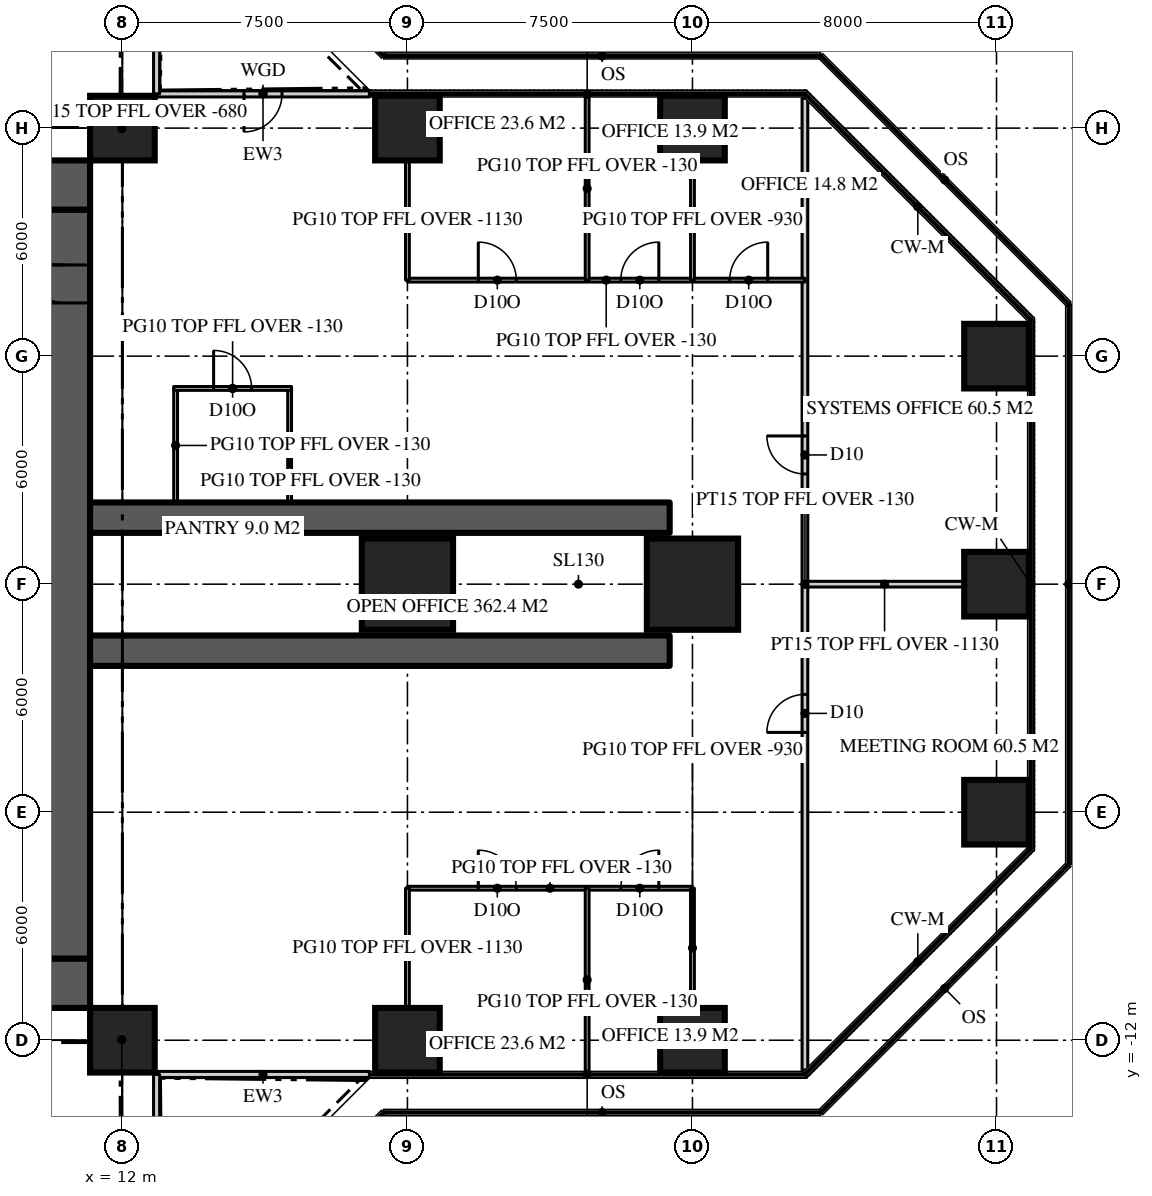
"""IFC4 building model, lengths in metres.
Left out: names, types, materials, properties, quantities, classifications, styles, units other than length and angle.
Written with IfcOpenShell. Run it as: python <this file> out.ifc"""

import sys

from ifc_helpers import new_model, si_unit, direction, frame, frame_2d, origin, origin_2d, place, context, subcontext, project, spatial, rectangle, extrude, element, fill, save


model = new_model("IFC4")
c1 = context("Model", 3, precision=1e-05, world=origin(), true_north=direction((0.0, 1.0)))
c2 = subcontext(c1, "Body", "Model", "MODEL_VIEW")
j1 = project(units=[si_unit("LENGTHUNIT", "METRE"), si_unit("PLANEANGLEUNIT", "RADIAN")], contexts=[c1])
p1 = place(None, origin())
s1 = spatial("IfcSite", under=j1, at=p1, CompositionType="ELEMENT")
p2 = place(p1, origin())
s2 = spatial("IfcBuilding", under=s1, at=p2, CompositionType="ELEMENT")
p3 = place(p2, frame((0.0, 0.0, 147.6)))
s3 = spatial("IfcBuildingStorey", under=s2, at=p3, CompositionType="ELEMENT", Elevation=147.6)
p4 = place(p3, frame((-11.15, 10.5, 0.0), z_axis=(0.0, 0.0, 1.0), x_axis=(1.0, 0.0, 0.0)))
e1 = element("IfcWall", 1, at=p4, inside=s3, PredefinedType="SHEAR", context=c2, shape_type="SweptSolid", body=[
    extrude(rectangle(XDim=22.3, YDim=1.3, at=frame_2d((11.15, 0.0))), origin(), (0.0, 0.0, 1.0), 3.9),
])
p5 = place(p4, frame((4.25, 0.0, 0.0)))
e2 = element("IfcOpeningElement", 2, at=p5, cuts=e1, PredefinedType="OPENING", context=c2, shape_type="SweptSolid", body=[
    extrude(rectangle(XDim=1.8, YDim=2.2, at=frame_2d((0.9, 1.1))), frame((0.0, 0.66, 0.0), z_axis=(0.0, -1.0, 0.0), x_axis=(1.0, 0.0, 0.0)), (0.0, 0.0, 1.0), 1.32),
])
p6 = place(p4, frame((16.25, 0.0, 0.0)))
e3 = element("IfcOpeningElement", 3, at=p6, cuts=e1, PredefinedType="OPENING", context=c2, shape_type="SweptSolid", body=[
    extrude(rectangle(XDim=1.8, YDim=2.2, at=frame_2d((0.9, 1.1))), frame((0.0, 0.66, 0.0), z_axis=(0.0, -1.0, 0.0), x_axis=(1.0, 0.0, 0.0)), (0.0, 0.0, 1.0), 1.32),
])
p7 = place(p3, frame((11.15, -10.5, 0.0), z_axis=(0.0, 0.0, 1.0), x_axis=(-1.0, 0.0, 0.0)))
e4 = element("IfcWall", 4, at=p7, inside=s3, PredefinedType="SHEAR", context=c2, shape_type="SweptSolid", body=[
    extrude(rectangle(XDim=22.3, YDim=1.3, at=frame_2d((11.15, 0.0))), origin(), (0.0, 0.0, 1.0), 3.9),
])
p8 = place(p7, frame((16.25, 0.0, 0.0)))
e5 = element("IfcOpeningElement", 5, at=p8, cuts=e4, PredefinedType="OPENING", context=c2, shape_type="SweptSolid", body=[
    extrude(rectangle(XDim=1.8, YDim=2.2, at=frame_2d((0.9, 1.1))), frame((0.0, 0.66, 0.0), z_axis=(0.0, -1.0, 0.0), x_axis=(1.0, 0.0, 0.0)), (0.0, 0.0, 1.0), 1.32),
])
p9 = place(p7, frame((4.25, 0.0, 0.0)))
e6 = element("IfcOpeningElement", 6, at=p9, cuts=e4, PredefinedType="OPENING", context=c2, shape_type="SweptSolid", body=[
    extrude(rectangle(XDim=1.8, YDim=2.2, at=frame_2d((0.9, 1.1))), frame((0.0, 0.66, 0.0), z_axis=(0.0, -1.0, 0.0), x_axis=(1.0, 0.0, 0.0)), (0.0, 0.0, 1.0), 1.32),
])
p10 = place(p3, frame((10.5, -9.85, 0.0), z_axis=(0.0, 0.0, 1.0), x_axis=(0.0, 1.0, 0.0)))
e7 = element("IfcWall", 7, at=p10, inside=s3, PredefinedType="SHEAR", context=c2, shape_type="SweptSolid", body=[
    extrude(rectangle(XDim=19.7, YDim=1.3, at=frame_2d((9.85, 0.0))), origin(), (0.0, 0.0, 1.0), 3.9),
])
p11 = place(p10, frame((17.25, 0.0, 0.0)))
e8 = element("IfcOpeningElement", 8, at=p11, cuts=e7, PredefinedType="OPENING", context=c2, shape_type="SweptSolid", body=[
    extrude(rectangle(XDim=1.0, YDim=2.2, at=frame_2d((0.5, 1.1))), frame((0.0, 0.66, 0.0), z_axis=(0.0, -1.0, 0.0), x_axis=(1.0, 0.0, 0.0)), (0.0, 0.0, 1.0), 1.32),
])
for number, where, z_axis, x_axis in (
    (9, (11.15, -1.75, 0.0), (0.0, 0.0, 1.0), (1.0, 0.0, 0.0)),
    (10, (11.15, 1.75, 0.0), (0.0, 0.0, 1.0), (1.0, 0.0, 0.0)),
):
    element("IfcWall", number, at=place(p3, frame(where, z_axis=z_axis, x_axis=x_axis)), inside=s3, PredefinedType="SHEAR", context=c2, shape_type="SweptSolid", body=[
        extrude(rectangle(XDim=15.25, YDim=0.8, at=frame_2d((7.625, 0.0))), origin(), (0.0, 0.0, 1.0), 3.9),
    ])
for number, where, z_axis, x_axis in (
    (11, (12.0, -12.0, 0.0), (0.0, 0.0, 1.0), (1.0, 0.0, 0.0)),
    (12, (19.5, -12.0, 0.0), (0.0, 0.0, 1.0), (1.0, 0.0, 0.0)),
    (13, (27.0, -12.0, 0.0), (0.0, 0.0, 1.0), (1.0, 0.0, 0.0)),
    (14, (35.0, -6.0, 0.0), (0.0, 0.0, 1.0), (1.0, 0.0, 0.0)),
):
    element("IfcColumn", number, at=place(p3, frame(where, z_axis=z_axis, x_axis=x_axis)), inside=s3, PredefinedType="COLUMN", context=c2, shape_type="SweptSolid", body=[
        extrude(rectangle(XDim=1.7, YDim=1.7, at=origin_2d()), origin(), (0.0, 0.0, 1.0), 3.9),
    ])
for number, where, z_axis, x_axis in (
    (15, (19.5, 0.0, 0.0), (0.0, 0.0, 1.0), (1.0, 0.0, 0.0)),
    (16, (27.0, 0.0, 0.0), (0.0, 0.0, 1.0), (1.0, 0.0, 0.0)),
):
    element("IfcColumn", number, at=place(p3, frame(where, z_axis=z_axis, x_axis=x_axis)), inside=s3, PredefinedType="COLUMN", context=c2, shape_type="SweptSolid", body=[
        extrude(rectangle(XDim=2.4, YDim=2.4, at=origin_2d()), origin(), (0.0, 0.0, 1.0), 3.9),
    ])
for number, where, z_axis, x_axis in (
    (17, (35.0, 0.0, 0.0), (0.0, 0.0, 1.0), (1.0, 0.0, 0.0)),
    (18, (35.0, 6.0, 0.0), (0.0, 0.0, 1.0), (1.0, 0.0, 0.0)),
    (19, (12.0, 12.0, 0.0), (0.0, 0.0, 1.0), (1.0, 0.0, 0.0)),
    (20, (19.5, 12.0, 0.0), (0.0, 0.0, 1.0), (1.0, 0.0, 0.0)),
    (21, (27.0, 12.0, 0.0), (0.0, 0.0, 1.0), (1.0, 0.0, 0.0)),
):
    element("IfcColumn", number, at=place(p3, frame(where, z_axis=z_axis, x_axis=x_axis)), inside=s3, PredefinedType="COLUMN", context=c2, shape_type="SweptSolid", body=[
        extrude(rectangle(XDim=1.7, YDim=1.7, at=origin_2d()), origin(), (0.0, 0.0, 1.0), 3.9),
    ])
p12 = place(p3, frame((12.9, -12.9, 0.0), z_axis=(0.0, 0.0, 1.0), x_axis=(1.0, 0.0, 0.0)))
e22 = element("IfcWall", 22, at=p12, inside=s3, PredefinedType="SOLIDWALL", context=c2, shape_type="SweptSolid", body=[
    extrude(rectangle(XDim=5.6, YDim=0.16, at=frame_2d((2.8, 0.0))), origin(), (0.0, 0.0, 1.0), 3.77),
])
p13 = place(p3, frame((18.5, 12.9, 0.0), z_axis=(0.0, 0.0, 1.0), x_axis=(-1.0, 0.0, 0.0)))
e23 = element("IfcWall", 23, at=p13, inside=s3, PredefinedType="SOLIDWALL", context=c2, shape_type="SweptSolid", body=[
    extrude(rectangle(XDim=5.6, YDim=0.16, at=frame_2d((2.8, 0.0))), origin(), (0.0, 0.0, 1.0), 3.77),
])
p14 = place(p13, frame((2.3, 0.0, 0.0)))
e24 = element("IfcOpeningElement", 24, at=p14, cuts=e23, PredefinedType="OPENING", context=c2, shape_type="SweptSolid", body=[
    extrude(rectangle(XDim=1.0, YDim=2.2, at=frame_2d((0.5, 1.1))), frame((0.0, 0.09, 0.0), z_axis=(0.0, -1.0, 0.0), x_axis=(1.0, 0.0, 0.0)), (0.0, 0.0, 1.0), 0.18),
])
p15 = place(p3, frame((12.9, 12.9, 0.0), z_axis=(0.0, 0.0, 1.0), x_axis=(0.0, 1.0, 0.0)))
e25 = element("IfcWall", 25, at=p15, inside=s3, PredefinedType="SOLIDWALL", context=c2, shape_type="SweptSolid", body=[
    extrude(rectangle(XDim=5.6, YDim=0.16, at=frame_2d((2.8, 0.0))), origin(), (0.0, 0.0, 1.0), 3.77),
])
p16 = place(p3, frame((12.9, -18.5, 0.0), z_axis=(0.0, 0.0, 1.0), x_axis=(0.0, 1.0, 0.0)))
e26 = element("IfcWall", 26, at=p16, inside=s3, PredefinedType="SOLIDWALL", context=c2, shape_type="SweptSolid", body=[
    extrude(rectangle(XDim=5.6, YDim=0.16, at=frame_2d((2.8, 0.0))), origin(), (0.0, 0.0, 1.0), 3.77),
])
p17 = place(p16, frame((2.3, 0.0, 0.0)))
e27 = element("IfcOpeningElement", 27, at=p17, cuts=e26, PredefinedType="OPENING", context=c2, shape_type="SweptSolid", body=[
    extrude(rectangle(XDim=1.0, YDim=2.2, at=frame_2d((0.5, 1.1))), frame((0.0, 0.09, 0.0), z_axis=(0.0, -1.0, 0.0), x_axis=(1.0, 0.0, 0.0)), (0.0, 0.0, 1.0), 0.18),
])
p18 = place(p3, frame((29.959, -12.786, 0.0), z_axis=(0.0, 0.0, 1.0), x_axis=(0.0, 1.0, 0.0)))
e28 = element("IfcWall", 28, at=p18, inside=s3, PredefinedType="PARTITIONING", context=c2, shape_type="SweptSolid", body=[
    extrude(rectangle(XDim=25.573, YDim=0.15, at=frame_2d((12.786, 0.0))), origin(), (0.0, 0.0, 1.0), 3.77),
])
p19 = place(p18, frame((15.687, 0.0, 0.0)))
e29 = element("IfcOpeningElement", 29, at=p19, cuts=e28, PredefinedType="OPENING", context=c2, shape_type="SweptSolid", body=[
    extrude(rectangle(XDim=1.0, YDim=2.2, at=frame_2d((0.5, 1.1))), frame((0.0, 0.085, 0.0), z_axis=(0.0, -1.0, 0.0), x_axis=(1.0, 0.0, 0.0)), (0.0, 0.0, 1.0), 0.17),
])
p20 = place(p18, frame((8.886, 0.0, 0.0)))
e30 = element("IfcOpeningElement", 30, at=p20, cuts=e28, PredefinedType="OPENING", context=c2, shape_type="SweptSolid", body=[
    extrude(rectangle(XDim=1.0, YDim=2.2, at=frame_2d((0.5, 1.1))), frame((0.0, 0.085, 0.0), z_axis=(0.0, -1.0, 0.0), x_axis=(1.0, 0.0, 0.0)), (0.0, 0.0, 1.0), 0.17),
])
p21 = place(p3, frame((29.959, 0.0, 0.0), z_axis=(0.0, 0.0, 1.0), x_axis=(1.0, 0.0, 0.0)))
e31 = element("IfcWall", 31, at=p21, inside=s3, PredefinedType="PARTITIONING", context=c2, shape_type="SweptSolid", body=[
    extrude(rectangle(XDim=4.191, YDim=0.15, at=frame_2d((2.095, 0.0))), origin(), (0.0, 0.0, 1.0), 2.77),
])
p22 = place(p3, frame((19.5, 8.0, 0.0), z_axis=(0.0, 0.0, 1.0), x_axis=(1.0, 0.0, 0.0)))
e32 = element("IfcWall", 32, at=p22, inside=s3, PredefinedType="PARTITIONING", context=c2, shape_type="SweptSolid", body=[
    extrude(rectangle(XDim=10.459, YDim=0.1, at=frame_2d((5.229, 0.0))), origin(), (0.0, 0.0, 1.0), 3.77),
])
p23 = place(p22, frame((1.865, 0.0, 0.0)))
e33 = element("IfcOpeningElement", 33, at=p23, cuts=e32, PredefinedType="OPENING", context=c2, shape_type="SweptSolid", body=[
    extrude(rectangle(XDim=1.0, YDim=2.2, at=frame_2d((0.5, 1.1))), frame((0.0, 0.06, 0.0), z_axis=(0.0, -1.0, 0.0), x_axis=(1.0, 0.0, 0.0)), (0.0, 0.0, 1.0), 0.12),
])
p24 = place(p22, frame((5.615, 0.0, 0.0)))
e34 = element("IfcOpeningElement", 34, at=p24, cuts=e32, PredefinedType="OPENING", context=c2, shape_type="SweptSolid", body=[
    extrude(rectangle(XDim=1.0, YDim=2.2, at=frame_2d((0.5, 1.1))), frame((0.0, 0.06, 0.0), z_axis=(0.0, -1.0, 0.0), x_axis=(1.0, 0.0, 0.0)), (0.0, 0.0, 1.0), 0.12),
])
p25 = place(p22, frame((8.479, 0.0, 0.0)))
e35 = element("IfcOpeningElement", 35, at=p25, cuts=e32, PredefinedType="OPENING", context=c2, shape_type="SweptSolid", body=[
    extrude(rectangle(XDim=1.0, YDim=2.2, at=frame_2d((0.5, 1.1))), frame((0.0, 0.06, 0.0), z_axis=(0.0, -1.0, 0.0), x_axis=(1.0, 0.0, 0.0)), (0.0, 0.0, 1.0), 0.12),
])
p26 = place(p3, frame((19.5, 8.0, 0.0), z_axis=(0.0, 0.0, 1.0), x_axis=(0.0, 1.0, 0.0)))
e36 = element("IfcWall", 36, at=p26, inside=s3, PredefinedType="PARTITIONING", context=c2, shape_type="SweptSolid", body=[
    extrude(rectangle(XDim=3.15, YDim=0.1, at=frame_2d((1.575, 0.0))), origin(), (0.0, 0.0, 1.0), 2.77),
])
p27 = place(p3, frame((24.229, 8.0, 0.0), z_axis=(0.0, 0.0, 1.0), x_axis=(0.0, 1.0, 0.0)))
e37 = element("IfcWall", 37, at=p27, inside=s3, PredefinedType="PARTITIONING", context=c2, shape_type="SweptSolid", body=[
    extrude(rectangle(XDim=4.82, YDim=0.1, at=frame_2d((2.41, 0.0))), origin(), (0.0, 0.0, 1.0), 3.77),
])
p28 = place(p3, frame((27.0, 8.0, 0.0), z_axis=(0.0, 0.0, 1.0), x_axis=(0.0, 1.0, 0.0)))
e38 = element("IfcWall", 38, at=p28, inside=s3, PredefinedType="PARTITIONING", context=c2, shape_type="SweptSolid", body=[
    extrude(rectangle(XDim=3.15, YDim=0.1, at=frame_2d((1.575, 0.0))), origin(), (0.0, 0.0, 1.0), 2.97),
])
p29 = place(p3, frame((19.5, -8.0, 0.0), z_axis=(0.0, 0.0, 1.0), x_axis=(1.0, 0.0, 0.0)))
e39 = element("IfcWall", 39, at=p29, inside=s3, PredefinedType="PARTITIONING", context=c2, shape_type="SweptSolid", body=[
    extrude(rectangle(XDim=7.5, YDim=0.1, at=frame_2d((3.75, 0.0))), origin(), (0.0, 0.0, 1.0), 3.77),
])
p30 = place(p29, frame((1.865, 0.0, 0.0)))
e40 = element("IfcOpeningElement", 40, at=p30, cuts=e39, PredefinedType="OPENING", context=c2, shape_type="SweptSolid", body=[
    extrude(rectangle(XDim=1.0, YDim=2.2, at=frame_2d((0.5, 1.1))), frame((0.0, 0.06, 0.0), z_axis=(0.0, -1.0, 0.0), x_axis=(1.0, 0.0, 0.0)), (0.0, 0.0, 1.0), 0.12),
])
p31 = place(p29, frame((5.615, 0.0, 0.0)))
e41 = element("IfcOpeningElement", 41, at=p31, cuts=e39, PredefinedType="OPENING", context=c2, shape_type="SweptSolid", body=[
    extrude(rectangle(XDim=1.0, YDim=2.2, at=frame_2d((0.5, 1.1))), frame((0.0, 0.06, 0.0), z_axis=(0.0, -1.0, 0.0), x_axis=(1.0, 0.0, 0.0)), (0.0, 0.0, 1.0), 0.12),
])
p32 = place(p3, frame((19.5, -8.0, 0.0), z_axis=(0.0, 0.0, 1.0), x_axis=(0.0, -1.0, 0.0)))
e42 = element("IfcWall", 42, at=p32, inside=s3, PredefinedType="PARTITIONING", context=c2, shape_type="SweptSolid", body=[
    extrude(rectangle(XDim=3.15, YDim=0.1, at=frame_2d((1.575, 0.0))), origin(), (0.0, 0.0, 1.0), 2.77),
])
p33 = place(p3, frame((24.229, -8.0, 0.0), z_axis=(0.0, 0.0, 1.0), x_axis=(0.0, -1.0, 0.0)))
e43 = element("IfcWall", 43, at=p33, inside=s3, PredefinedType="PARTITIONING", context=c2, shape_type="SweptSolid", body=[
    extrude(rectangle(XDim=4.82, YDim=0.1, at=frame_2d((2.41, 0.0))), origin(), (0.0, 0.0, 1.0), 3.77),
])
p34 = place(p3, frame((27.0, -8.0, 0.0), z_axis=(0.0, 0.0, 1.0), x_axis=(0.0, -1.0, 0.0)))
e44 = element("IfcWall", 44, at=p34, inside=s3, PredefinedType="PARTITIONING", context=c2, shape_type="SweptSolid", body=[
    extrude(rectangle(XDim=3.15, YDim=0.1, at=frame_2d((1.575, 0.0))), origin(), (0.0, 0.0, 1.0), 2.97),
])
for number, where, z_axis, x_axis in (
    (45, (13.4, 2.15, 0.0), (0.0, 0.0, 1.0), (0.0, 1.0, 0.0)),
    (46, (16.4, 2.15, 0.0), (0.0, 0.0, 1.0), (0.0, 1.0, 0.0)),
):
    element("IfcWall", number, at=place(p3, frame(where, z_axis=z_axis, x_axis=x_axis)), inside=s3, PredefinedType="PARTITIONING", context=c2, shape_type="SweptSolid", body=[
        extrude(rectangle(XDim=3.0, YDim=0.1, at=frame_2d((1.5, 0.0))), origin(), (0.0, 0.0, 1.0), 3.77),
    ])
p35 = place(p3, frame((13.35, 5.15, 0.0), z_axis=(0.0, 0.0, 1.0), x_axis=(1.0, 0.0, 0.0)))
e47 = element("IfcWall", 47, at=p35, inside=s3, PredefinedType="PARTITIONING", context=c2, shape_type="SweptSolid", body=[
    extrude(rectangle(XDim=3.1, YDim=0.1, at=frame_2d((1.55, 0.0))), origin(), (0.0, 0.0, 1.0), 3.77),
])
p36 = place(p35, frame((1.05, 0.0, 0.0)))
e48 = element("IfcOpeningElement", 48, at=p36, cuts=e47, PredefinedType="OPENING", context=c2, shape_type="SweptSolid", body=[
    extrude(rectangle(XDim=1.0, YDim=2.2, at=frame_2d((0.5, 1.1))), frame((0.0, 0.06, 0.0), z_axis=(0.0, -1.0, 0.0), x_axis=(1.0, 0.0, 0.0)), (0.0, 0.0, 1.0), 0.12),
])
for number, where, z_axis, x_axis in (
    (49, (11.15, 11.15, 0.0), (0.0, 0.0, 1.0), (0.707, 0.707, 0.0)),
    (50, (11.15, -11.15, 0.0), (0.0, 0.0, 1.0), (0.707, -0.707, 0.0)),
):
    element("IfcWall", number, at=place(p3, frame(where, z_axis=z_axis, x_axis=x_axis)), inside=s3, PredefinedType="PARTITIONING", context=c2, shape_type="SweptSolid", body=[
        extrude(rectangle(XDim=2.362, YDim=0.15, at=frame_2d((1.181, 0.0))), origin(), (0.0, 0.0, 1.0), 3.22),
    ])
p37 = place(p14, origin())
e51 = element("IfcDoor", 51, at=p37, inside=s3, OperationType="SINGLE_SWING_RIGHT", PredefinedType="DOOR", context=c2, shape_type="SweptSolid", body=[
    extrude(rectangle(XDim=1.0, YDim=2.2, at=frame_2d((0.5, 1.1))), frame((0.0, 0.025, 0.0), z_axis=(0.0, -1.0, 0.0), x_axis=(1.0, 0.0, 0.0)), (0.0, 0.0, 1.0), 0.05),
])
fill(e24, e51)
p38 = place(p11, origin())
e52 = element("IfcDoor", 52, at=p38, inside=s3, OperationType="SINGLE_SWING_RIGHT", PredefinedType="DOOR", context=c2, shape_type="SweptSolid", body=[
    extrude(rectangle(XDim=1.0, YDim=2.2, at=frame_2d((0.5, 1.1))), frame((0.0, 0.025, 0.0), z_axis=(0.0, -1.0, 0.0), x_axis=(1.0, 0.0, 0.0)), (0.0, 0.0, 1.0), 0.05),
])
fill(e8, e52)
p39 = place(p19, origin())
e53 = element("IfcDoor", 53, at=p39, inside=s3, OperationType="SINGLE_SWING_RIGHT", PredefinedType="DOOR", context=c2, shape_type="SweptSolid", body=[
    extrude(rectangle(XDim=1.0, YDim=2.2, at=frame_2d((0.5, 1.1))), frame((0.0, 0.025, 0.0), z_axis=(0.0, -1.0, 0.0), x_axis=(1.0, 0.0, 0.0)), (0.0, 0.0, 1.0), 0.05),
])
fill(e29, e53)
p40 = place(p20, origin())
e54 = element("IfcDoor", 54, at=p40, inside=s3, OperationType="SINGLE_SWING_LEFT", PredefinedType="DOOR", context=c2, shape_type="SweptSolid", body=[
    extrude(rectangle(XDim=1.0, YDim=2.2, at=frame_2d((0.5, 1.1))), frame((0.0, 0.025, 0.0), z_axis=(0.0, -1.0, 0.0), x_axis=(1.0, 0.0, 0.0)), (0.0, 0.0, 1.0), 0.05),
])
fill(e30, e54)
p41 = place(p23, origin())
e55 = element("IfcDoor", 55, at=p41, inside=s3, OperationType="SINGLE_SWING_LEFT", PredefinedType="DOOR", context=c2, shape_type="SweptSolid", body=[
    extrude(rectangle(XDim=1.0, YDim=2.2, at=frame_2d((0.5, 1.1))), frame((0.0, 0.025, 0.0), z_axis=(0.0, -1.0, 0.0), x_axis=(1.0, 0.0, 0.0)), (0.0, 0.0, 1.0), 0.05),
])
fill(e33, e55)
p42 = place(p24, origin())
e56 = element("IfcDoor", 56, at=p42, inside=s3, OperationType="SINGLE_SWING_RIGHT", PredefinedType="DOOR", context=c2, shape_type="SweptSolid", body=[
    extrude(rectangle(XDim=1.0, YDim=2.2, at=frame_2d((0.5, 1.1))), frame((0.0, 0.025, 0.0), z_axis=(0.0, -1.0, 0.0), x_axis=(1.0, 0.0, 0.0)), (0.0, 0.0, 1.0), 0.05),
])
fill(e34, e56)
p43 = place(p25, origin())
e57 = element("IfcDoor", 57, at=p43, inside=s3, OperationType="SINGLE_SWING_RIGHT", PredefinedType="DOOR", context=c2, shape_type="SweptSolid", body=[
    extrude(rectangle(XDim=1.0, YDim=2.2, at=frame_2d((0.5, 1.1))), frame((0.0, 0.025, 0.0), z_axis=(0.0, -1.0, 0.0), x_axis=(1.0, 0.0, 0.0)), (0.0, 0.0, 1.0), 0.05),
])
fill(e35, e57)
p44 = place(p30, origin())
e58 = element("IfcDoor", 58, at=p44, inside=s3, OperationType="SINGLE_SWING_LEFT", PredefinedType="DOOR", context=c2, shape_type="SweptSolid", body=[
    extrude(rectangle(XDim=1.0, YDim=2.2, at=frame_2d((0.5, 1.1))), frame((0.0, 0.025, 0.0), z_axis=(0.0, -1.0, 0.0), x_axis=(1.0, 0.0, 0.0)), (0.0, 0.0, 1.0), 0.05),
])
fill(e40, e58)
p45 = place(p31, origin())
e59 = element("IfcDoor", 59, at=p45, inside=s3, OperationType="SINGLE_SWING_RIGHT", PredefinedType="DOOR", context=c2, shape_type="SweptSolid", body=[
    extrude(rectangle(XDim=1.0, YDim=2.2, at=frame_2d((0.5, 1.1))), frame((0.0, 0.025, 0.0), z_axis=(0.0, -1.0, 0.0), x_axis=(1.0, 0.0, 0.0)), (0.0, 0.0, 1.0), 0.05),
])
fill(e41, e59)
p46 = place(p36, origin())
e60 = element("IfcDoor", 60, at=p46, inside=s3, OperationType="SINGLE_SWING_LEFT", PredefinedType="DOOR", context=c2, shape_type="SweptSolid", body=[
    extrude(rectangle(XDim=1.0, YDim=2.2, at=frame_2d((0.5, 1.1))), frame((0.0, 0.025, 0.0), z_axis=(0.0, -1.0, 0.0), x_axis=(1.0, 0.0, 0.0)), (0.0, 0.0, 1.0), 0.05),
])
fill(e48, e60)
save(model, sys.argv[1])
